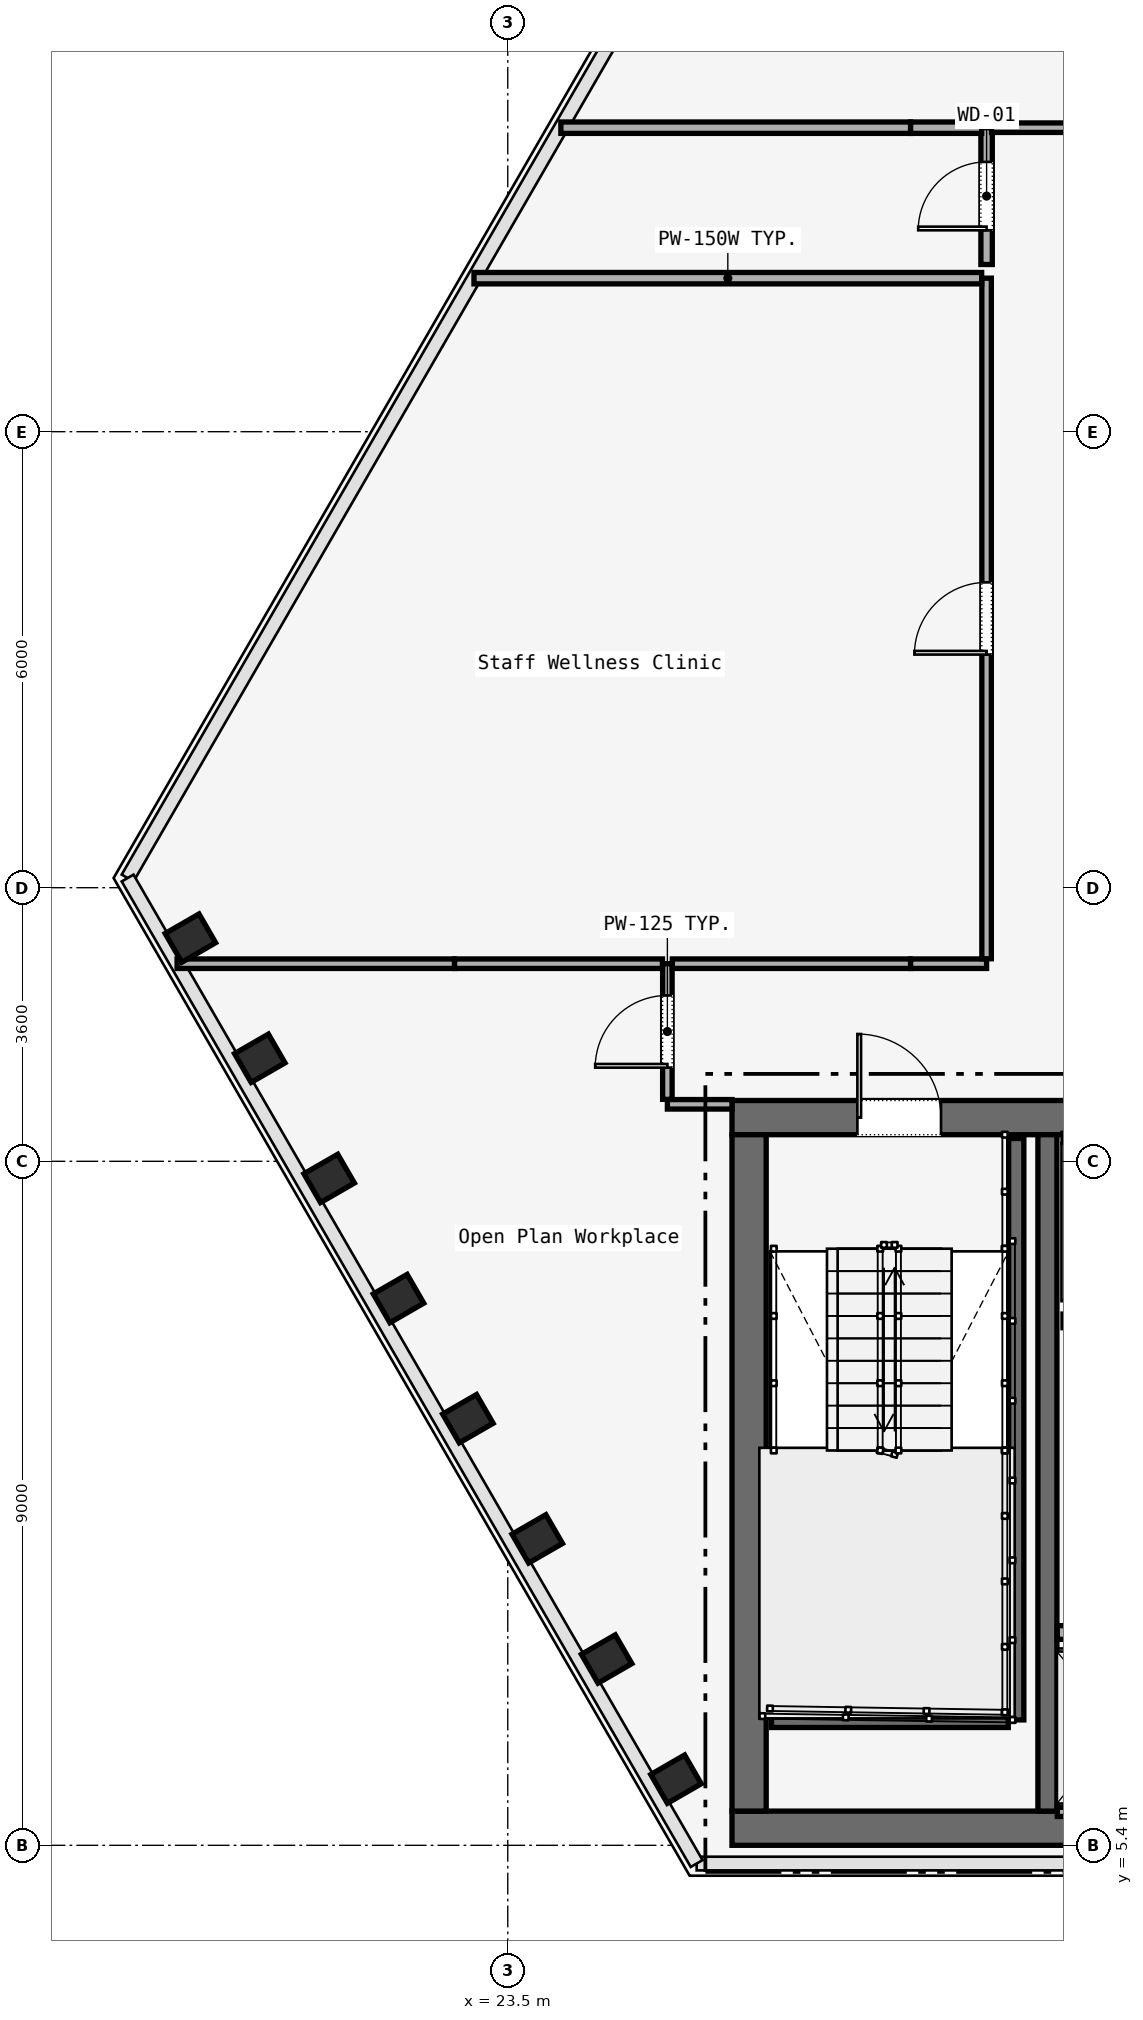
"""IFC4 building model, lengths in metres.
Left out: names, types, materials, properties, quantities, classifications, styles, units other than length and angle.
Written with IfcOpenShell. Run it as: python <this file> out.ifc"""

import sys

from ifc_helpers import new_model, si_unit, direction, frame, frame_2d, origin, origin_2d, place, context, subcontext, project, spatial, rectangle, i_section, extrude, element, fill, save


model = new_model("IFC4")
c1 = context("Model", 3, precision=1e-05, world=origin(), true_north=direction((0.0, 1.0)))
c2 = subcontext(c1, "Body", "Model", "MODEL_VIEW")
j1 = project(units=[si_unit("LENGTHUNIT", "METRE"), si_unit("PLANEANGLEUNIT", "RADIAN")], contexts=[c1])
p1 = place(None, origin())
s1 = spatial("IfcSite", under=j1, at=p1, CompositionType="ELEMENT")
p2 = place(p1, origin())
s2 = spatial("IfcBuilding", under=s1, at=p2, CompositionType="ELEMENT")
p3 = place(p2, frame((0.0, 0.0, 70.2)))
s3 = spatial("IfcBuildingStorey", under=s2, at=p3, CompositionType="ELEMENT", Elevation=70.2)
p4 = place(p3, frame((26.45, 14.975, 0.0), z_axis=(0.0, 0.0, 1.0), x_axis=(1.0, 0.0, 0.0)))
e1 = element("IfcWall", 1, at=p4, inside=s3, PredefinedType="SOLIDWALL", context=c2, shape_type="SweptSolid", body=[
    extrude(rectangle(XDim=31.1, YDim=0.45, at=frame_2d((15.55, 0.0))), origin(), (0.0, 0.0, 1.0), 3.58),
])
p5 = place(p4, frame((1.65, 0.0, 0.0)))
e2 = element("IfcOpeningElement", 2, at=p5, cuts=e1, PredefinedType="OPENING", context=c2, shape_type="SweptSolid", body=[
    extrude(rectangle(XDim=1.1, YDim=2.2, at=frame_2d((0.55, 1.1))), frame((0.0, 0.225, 0.0), z_axis=(0.0, -1.0, 0.0), x_axis=(1.0, 0.0, 0.0)), (0.0, 0.0, 1.0), 0.45),
])
p6 = place(p4, frame((13.65, 0.0, 0.0)))
e3 = element("IfcOpeningElement", 3, at=p6, cuts=e1, PredefinedType="OPENING", context=c2, shape_type="SweptSolid", body=[
    extrude(rectangle(XDim=1.1, YDim=2.2, at=frame_2d((0.55, 1.1))), frame((0.0, 0.225, 0.0), z_axis=(0.0, -1.0, 0.0), x_axis=(1.0, 0.0, 0.0)), (0.0, 0.0, 1.0), 0.45),
])
p7 = place(p4, frame((25.55, 0.0, 0.0)))
e4 = element("IfcOpeningElement", 4, at=p7, cuts=e1, PredefinedType="OPENING", context=c2, shape_type="SweptSolid", body=[
    extrude(rectangle(XDim=1.1, YDim=2.2, at=frame_2d((0.55, 1.1))), frame((0.0, 0.225, 0.0), z_axis=(0.0, -1.0, 0.0), x_axis=(1.0, 0.0, 0.0)), (0.0, 0.0, 1.0), 0.45),
])
p8 = place(p4, frame((10.7, 0.0, 0.0)))
e5 = element("IfcOpeningElement", 5, at=p8, cuts=e1, PredefinedType="OPENING", context=c2, shape_type="SweptSolid", body=[
    extrude(rectangle(XDim=1.4, YDim=2.2, at=frame_2d((0.7, 1.1))), frame((0.0, 0.225, 0.0), z_axis=(0.0, -1.0, 0.0), x_axis=(1.0, 0.0, 0.0)), (0.0, 0.0, 1.0), 0.45),
])
p9 = place(p4, frame((19.35, 0.0, 0.0)))
e6 = element("IfcOpeningElement", 6, at=p9, cuts=e1, PredefinedType="OPENING", context=c2, shape_type="SweptSolid", body=[
    extrude(rectangle(XDim=1.1, YDim=2.2, at=frame_2d((0.55, 1.1))), frame((0.0, 0.225, 0.0), z_axis=(0.0, -1.0, 0.0), x_axis=(1.0, 0.0, 0.0)), (0.0, 0.0, 1.0), 0.45),
])
p10 = place(p4, frame((21.4, 0.0, 0.0)))
e7 = element("IfcOpeningElement", 7, at=p10, cuts=e1, PredefinedType="OPENING", context=c2, shape_type="SweptSolid", body=[
    extrude(rectangle(XDim=0.9, YDim=2.1, at=frame_2d((0.45, 1.05))), frame((0.0, 0.225, 0.0), z_axis=(0.0, -1.0, 0.0), x_axis=(1.0, 0.0, 0.0)), (0.0, 0.0, 1.0), 0.45),
])
p11 = place(p4, frame((23.35, 0.0, 0.0)))
e8 = element("IfcOpeningElement", 8, at=p11, cuts=e1, PredefinedType="OPENING", context=c2, shape_type="SweptSolid", body=[
    extrude(rectangle(XDim=1.3, YDim=2.3, at=frame_2d((0.65, 1.15))), frame((0.0, 0.225, 0.0), z_axis=(0.0, -1.0, 0.0), x_axis=(1.0, 0.0, 0.0)), (0.0, 0.0, 1.0), 0.45),
])
p12 = place(p3, frame((26.45, 5.625, 0.0), z_axis=(0.0, 0.0, 1.0), x_axis=(1.0, 0.0, 0.0)))
e9 = element("IfcWall", 9, at=p12, inside=s3, PredefinedType="SOLIDWALL", context=c2, shape_type="SweptSolid", body=[
    extrude(rectangle(XDim=31.1, YDim=0.45, at=frame_2d((15.55, 0.0))), origin(), (0.0, 0.0, 1.0), 3.58),
])
p13 = place(p3, frame((26.675, 5.85, 0.0), z_axis=(0.0, 0.0, 1.0), x_axis=(0.0, 1.0, 0.0)))
e10 = element("IfcWall", 10, at=p13, inside=s3, PredefinedType="SOLIDWALL", context=c2, shape_type="SweptSolid", body=[
    extrude(rectangle(XDim=8.9, YDim=0.45, at=frame_2d((4.45, 0.0))), origin(), (0.0, 0.0, 1.0), 3.58),
])
p14 = place(p3, frame((30.6, 5.85, 0.0), z_axis=(0.0, 0.0, 1.0), x_axis=(0.0, 1.0, 0.0)))
e11 = element("IfcWall", 11, at=p14, inside=s3, PredefinedType="SOLIDWALL", context=c2, shape_type="SweptSolid", body=[
    extrude(rectangle(XDim=8.9, YDim=0.25, at=frame_2d((4.45, 0.0))), origin(), (0.0, 0.0, 1.0), 3.58),
])
for number, where, z_axis, x_axis in (
    (12, (19.324, 17.337, 0.0), (0.0, 0.0, 1.0), (-0.5, 0.866, 0.0)),
    (13, (20.237, 15.756, 0.0), (0.0, 0.0, 1.0), (-0.5, 0.866, 0.0)),
    (14, (21.15, 14.175, 0.0), (0.0, 0.0, 1.0), (-0.5, 0.866, 0.0)),
    (15, (22.062, 12.594, 0.0), (0.0, 0.0, 1.0), (-0.5, 0.866, 0.0)),
    (16, (22.975, 11.013, 0.0), (0.0, 0.0, 1.0), (-0.5, 0.866, 0.0)),
    (17, (23.888, 9.432, 0.0), (0.0, 0.0, 1.0), (-0.5, 0.866, 0.0)),
    (18, (24.801, 7.851, 0.0), (0.0, 0.0, 1.0), (-0.5, 0.866, 0.0)),
    (19, (25.713, 6.271, 0.0), (0.0, 0.0, 1.0), (-0.5, 0.866, 0.0)),
):
    element("IfcColumn", number, at=place(p3, frame(where, z_axis=z_axis, x_axis=x_axis)), inside=s3, PredefinedType="COLUMN", context=c2, shape_type="SweptSolid", body=[
        extrude(i_section(OverallWidth=0.437, OverallDepth=0.514, WebThickness=0.061, FlangeThickness=0.077, FilletRadius=0.015, at=origin_2d()), origin(), (0.0, 0.0, 1.0), 3.58),
    ])
p15 = place(p3, frame((30.19, 14.7, 0.0), z_axis=(0.0, 0.0, 1.0), x_axis=(0.0, -1.0, 0.0)))
e20 = element("IfcWall", 20, at=p15, inside=s3, PredefinedType="SOLIDWALL", context=c2, shape_type="SweptSolid", body=[
    extrude(rectangle(XDim=7.65, YDim=0.2, at=frame_2d((3.825, 0.0))), origin(), (0.0, 0.0, 1.0), 3.8),
])
p16 = place(p3, frame((26.97, 7.05, 0.0), z_axis=(0.0, 0.0, 1.0), x_axis=(1.0, 0.0, 0.0)))
e21 = element("IfcWall", 21, at=p16, inside=s3, PredefinedType="SOLIDWALL", context=c2, shape_type="SweptSolid", body=[
    extrude(rectangle(XDim=3.115, YDim=0.2, at=frame_2d((1.558, 0.0))), origin(), (0.0, 0.0, 1.0), 3.8),
])
p17 = place(p3, frame((30.73, 8.2, 0.0), z_axis=(0.0, 0.0, 1.0), x_axis=(1.0, 0.0, 0.0)))
e22 = element("IfcWall", 22, at=p17, inside=s3, PredefinedType="SOLIDWALL", context=c2, shape_type="SweptSolid", body=[
    extrude(rectangle(XDim=1.665, YDim=0.18, at=frame_2d((0.833, 0.0))), origin(), (0.0, 0.0, 1.0), 2.95),
])
p18 = place(p17, frame((0.282, 0.0, 0.0)))
e23 = element("IfcOpeningElement", 23, at=p18, cuts=e22, PredefinedType="OPENING", context=c2, shape_type="SweptSolid", body=[
    extrude(rectangle(XDim=1.1, YDim=2.2, at=frame_2d((0.55, 1.1))), frame((0.0, 0.09, 0.0), z_axis=(0.0, -1.0, 0.0), x_axis=(1.0, 0.0, 0.0)), (0.0, 0.0, 1.0), 0.18),
])
p19 = place(p3, frame((30.73, 5.84, 0.0), z_axis=(0.0, 0.0, 1.0), x_axis=(1.0, 0.0, 0.0)))
e24 = element("IfcWall", 24, at=p19, inside=s3, PredefinedType="SOLIDWALL", context=c2, shape_type="SweptSolid", body=[
    extrude(rectangle(XDim=1.665, YDim=0.12, at=frame_2d((0.833, 0.0))), origin(), (0.0, 0.0, 1.0), 2.95),
])
p20 = place(p3, frame((26.45, 15.15, 0.0), z_axis=(0.0, 0.0, 1.0), x_axis=(-1.0, 0.0, 0.0)))
e25 = element("IfcWall", 25, at=p20, inside=s3, PredefinedType="PARTITIONING", context=c2, shape_type="SweptSolid", body=[
    extrude(rectangle(XDim=0.85, YDim=0.125, at=frame_2d((0.425, 0.0))), origin(), (0.0, 0.0, 1.0), 2.95),
])
p21 = place(p3, frame((25.6, 15.215, 0.0), z_axis=(0.0, 0.0, 1.0), x_axis=(0.0, 1.0, 0.0)))
e26 = element("IfcWall", 26, at=p21, inside=s3, PredefinedType="PARTITIONING", context=c2, shape_type="SweptSolid", body=[
    extrude(rectangle(XDim=1.785, YDim=0.125, at=frame_2d((0.893, 0.0))), origin(), (0.0, 0.0, 1.0), 2.95),
])
p22 = place(p21, frame((0.417, 0.0, 0.0)))
e27 = element("IfcOpeningElement", 27, at=p22, cuts=e26, PredefinedType="OPENING", context=c2, shape_type="SweptSolid", body=[
    extrude(rectangle(XDim=0.95, YDim=2.2, at=frame_2d((0.475, 1.1))), frame((0.0, 0.062, 0.0), z_axis=(0.0, -1.0, 0.0), x_axis=(1.0, 0.0, 0.0)), (0.0, 0.0, 1.0), 0.125),
])
p23 = place(p3, frame((25.665, 17.0, 0.0), z_axis=(0.0, 0.0, 1.0), x_axis=(1.0, 0.0, 0.0)))
e28 = element("IfcWall", 28, at=p23, inside=s3, PredefinedType="PARTITIONING", context=c2, shape_type="SweptSolid", body=[
    extrude(rectangle(XDim=3.135, YDim=0.125, at=frame_2d((1.567, 0.0))), origin(), (0.0, 0.0, 1.0), 2.95),
])
p24 = place(p3, frame((28.8, 17.0, 0.0), z_axis=(0.0, 0.0, 1.0), x_axis=(1.0, 0.0, 0.0)))
e29 = element("IfcWall", 29, at=p24, inside=s3, PredefinedType="PARTITIONING", context=c2, shape_type="SweptSolid", body=[
    extrude(rectangle(XDim=1.0, YDim=0.125, at=frame_2d((0.5, 0.0))), origin(), (0.0, 0.0, 1.0), 2.95),
])
p25 = place(p3, frame((29.8, 17.065, 0.0), z_axis=(0.0, 0.0, 1.0), x_axis=(0.0, 1.0, 0.0)))
e30 = element("IfcWall", 30, at=p25, inside=s3, PredefinedType="PARTITIONING", context=c2, shape_type="SweptSolid", body=[
    extrude(rectangle(XDim=8.955, YDim=0.125, at=frame_2d((4.478, 0.0))), origin(), (0.0, 0.0, 1.0), 2.95),
])
p26 = place(p25, frame((4.002, 0.0, 0.0)))
e31 = element("IfcOpeningElement", 31, at=p26, cuts=e30, PredefinedType="OPENING", context=c2, shape_type="SweptSolid", body=[
    extrude(rectangle(XDim=0.95, YDim=2.2, at=frame_2d((0.475, 1.1))), frame((0.0, 0.062, 0.0), z_axis=(0.0, -1.0, 0.0), x_axis=(1.0, 0.0, 0.0)), (0.0, 0.0, 1.0), 0.125),
])
p27 = place(p3, frame((29.8, 26.2, 0.0), z_axis=(0.0, 0.0, 1.0), x_axis=(0.0, 1.0, 0.0)))
e32 = element("IfcWall", 32, at=p27, inside=s3, PredefinedType="PARTITIONING", context=c2, shape_type="SweptSolid", body=[
    extrude(rectangle(XDim=1.8, YDim=0.15, at=frame_2d((0.9, 0.0))), origin(), (0.0, 0.0, 1.0), 2.95),
])
p28 = place(p27, frame((0.45, 0.0, 0.0)))
e33 = element("IfcOpeningElement", 33, at=p28, cuts=e32, PredefinedType="OPENING", context=c2, shape_type="SweptSolid", body=[
    extrude(rectangle(XDim=0.9, YDim=2.15, at=frame_2d((0.45, 1.075))), frame((0.0, 0.075, 0.0), z_axis=(0.0, -1.0, 0.0), x_axis=(1.0, 0.0, 0.0)), (0.0, 0.0, 1.0), 0.15),
])
p29 = place(p3, frame((29.865, 28.0, 0.0), z_axis=(0.0, 0.0, 1.0), x_axis=(1.0, 0.0, 0.0)))
e34 = element("IfcWall", 34, at=p29, inside=s3, PredefinedType="PARTITIONING", context=c2, shape_type="SweptSolid", body=[
    extrude(rectangle(XDim=1.735, YDim=0.125, at=frame_2d((0.868, 0.0))), origin(), (0.0, 0.0, 1.0), 2.95),
])
p30 = place(p3, frame((19.149, 17.0, 0.0), z_axis=(0.0, 0.0, 1.0), x_axis=(1.0, 0.0, 0.0)))
e35 = element("IfcWall", 35, at=p30, inside=s3, PredefinedType="PARTITIONING", context=c2, shape_type="SweptSolid", body=[
    extrude(rectangle(XDim=3.651, YDim=0.125, at=frame_2d((1.825, 0.0))), origin(), (0.0, 0.0, 1.0), 2.95),
])
p31 = place(p3, frame((22.8, 17.0, 0.0), z_axis=(0.0, 0.0, 1.0), x_axis=(1.0, 0.0, 0.0)))
e36 = element("IfcWall", 36, at=p31, inside=s3, PredefinedType="PARTITIONING", context=c2, shape_type="SweptSolid", body=[
    extrude(rectangle(XDim=2.735, YDim=0.125, at=frame_2d((1.367, 0.0))), origin(), (0.0, 0.0, 1.0), 2.95),
])
p32 = place(p3, frame((23.055, 26.02, 0.0), z_axis=(0.0, 0.0, 1.0), x_axis=(1.0, 0.0, 0.0)))
e37 = element("IfcWall", 37, at=p32, inside=s3, PredefinedType="PARTITIONING", context=c2, shape_type="SweptSolid", body=[
    extrude(rectangle(XDim=6.68, YDim=0.15, at=frame_2d((3.34, 0.0))), origin(), (0.0, 0.0, 1.0), 2.95),
])
p33 = place(p3, frame((24.199, 28.0, 0.0), z_axis=(0.0, 0.0, 1.0), x_axis=(1.0, 0.0, 0.0)))
e38 = element("IfcWall", 38, at=p33, inside=s3, PredefinedType="PARTITIONING", context=c2, shape_type="SweptSolid", body=[
    extrude(rectangle(XDim=4.601, YDim=0.15, at=frame_2d((2.301, 0.0))), origin(), (0.0, 0.0, 1.0), 2.95),
])
p34 = place(p3, frame((28.8, 28.0, 0.0), z_axis=(0.0, 0.0, 1.0), x_axis=(1.0, 0.0, 0.0)))
e39 = element("IfcWall", 39, at=p34, inside=s3, PredefinedType="PARTITIONING", context=c2, shape_type="SweptSolid", body=[
    extrude(rectangle(XDim=0.935, YDim=0.15, at=frame_2d((0.468, 0.0))), origin(), (0.0, 0.0, 1.0), 2.95),
])
p35 = place(p5, origin())
e40 = element("IfcDoor", 40, at=p35, inside=s3, OperationType="SINGLE_SWING_RIGHT", PredefinedType="DOOR", context=c2, shape_type="SweptSolid", body=[
    extrude(rectangle(XDim=1.1, YDim=2.2, at=frame_2d((0.55, 1.1))), frame((0.0, 0.025, 0.0), z_axis=(0.0, -1.0, 0.0), x_axis=(1.0, 0.0, 0.0)), (0.0, 0.0, 1.0), 0.05),
])
fill(e2, e40)
p36 = place(p22, origin())
e41 = element("IfcDoor", 41, at=p36, inside=s3, OperationType="SINGLE_SWING_RIGHT", PredefinedType="DOOR", context=c2, shape_type="SweptSolid", body=[
    extrude(rectangle(XDim=0.95, YDim=2.2, at=frame_2d((0.475, 1.1))), frame((0.0, 0.025, 0.0), z_axis=(0.0, -1.0, 0.0), x_axis=(1.0, 0.0, 0.0)), (0.0, 0.0, 1.0), 0.05),
])
fill(e27, e41)
p37 = place(p26, origin())
e42 = element("IfcDoor", 42, at=p37, inside=s3, OperationType="SINGLE_SWING_RIGHT", PredefinedType="DOOR", context=c2, shape_type="SweptSolid", body=[
    extrude(rectangle(XDim=0.95, YDim=2.2, at=frame_2d((0.475, 1.1))), frame((0.0, 0.025, 0.0), z_axis=(0.0, -1.0, 0.0), x_axis=(1.0, 0.0, 0.0)), (0.0, 0.0, 1.0), 0.05),
])
fill(e31, e42)
p38 = place(p28, origin())
e43 = element("IfcDoor", 43, at=p38, inside=s3, OperationType="SINGLE_SWING_LEFT", PredefinedType="DOOR", context=c2, shape_type="SweptSolid", body=[
    extrude(rectangle(XDim=0.9, YDim=2.15, at=frame_2d((0.45, 1.075))), frame((0.0, 0.025, 0.0), z_axis=(0.0, -1.0, 0.0), x_axis=(1.0, 0.0, 0.0)), (0.0, 0.0, 1.0), 0.05),
])
fill(e33, e43)
save(model, sys.argv[1])
